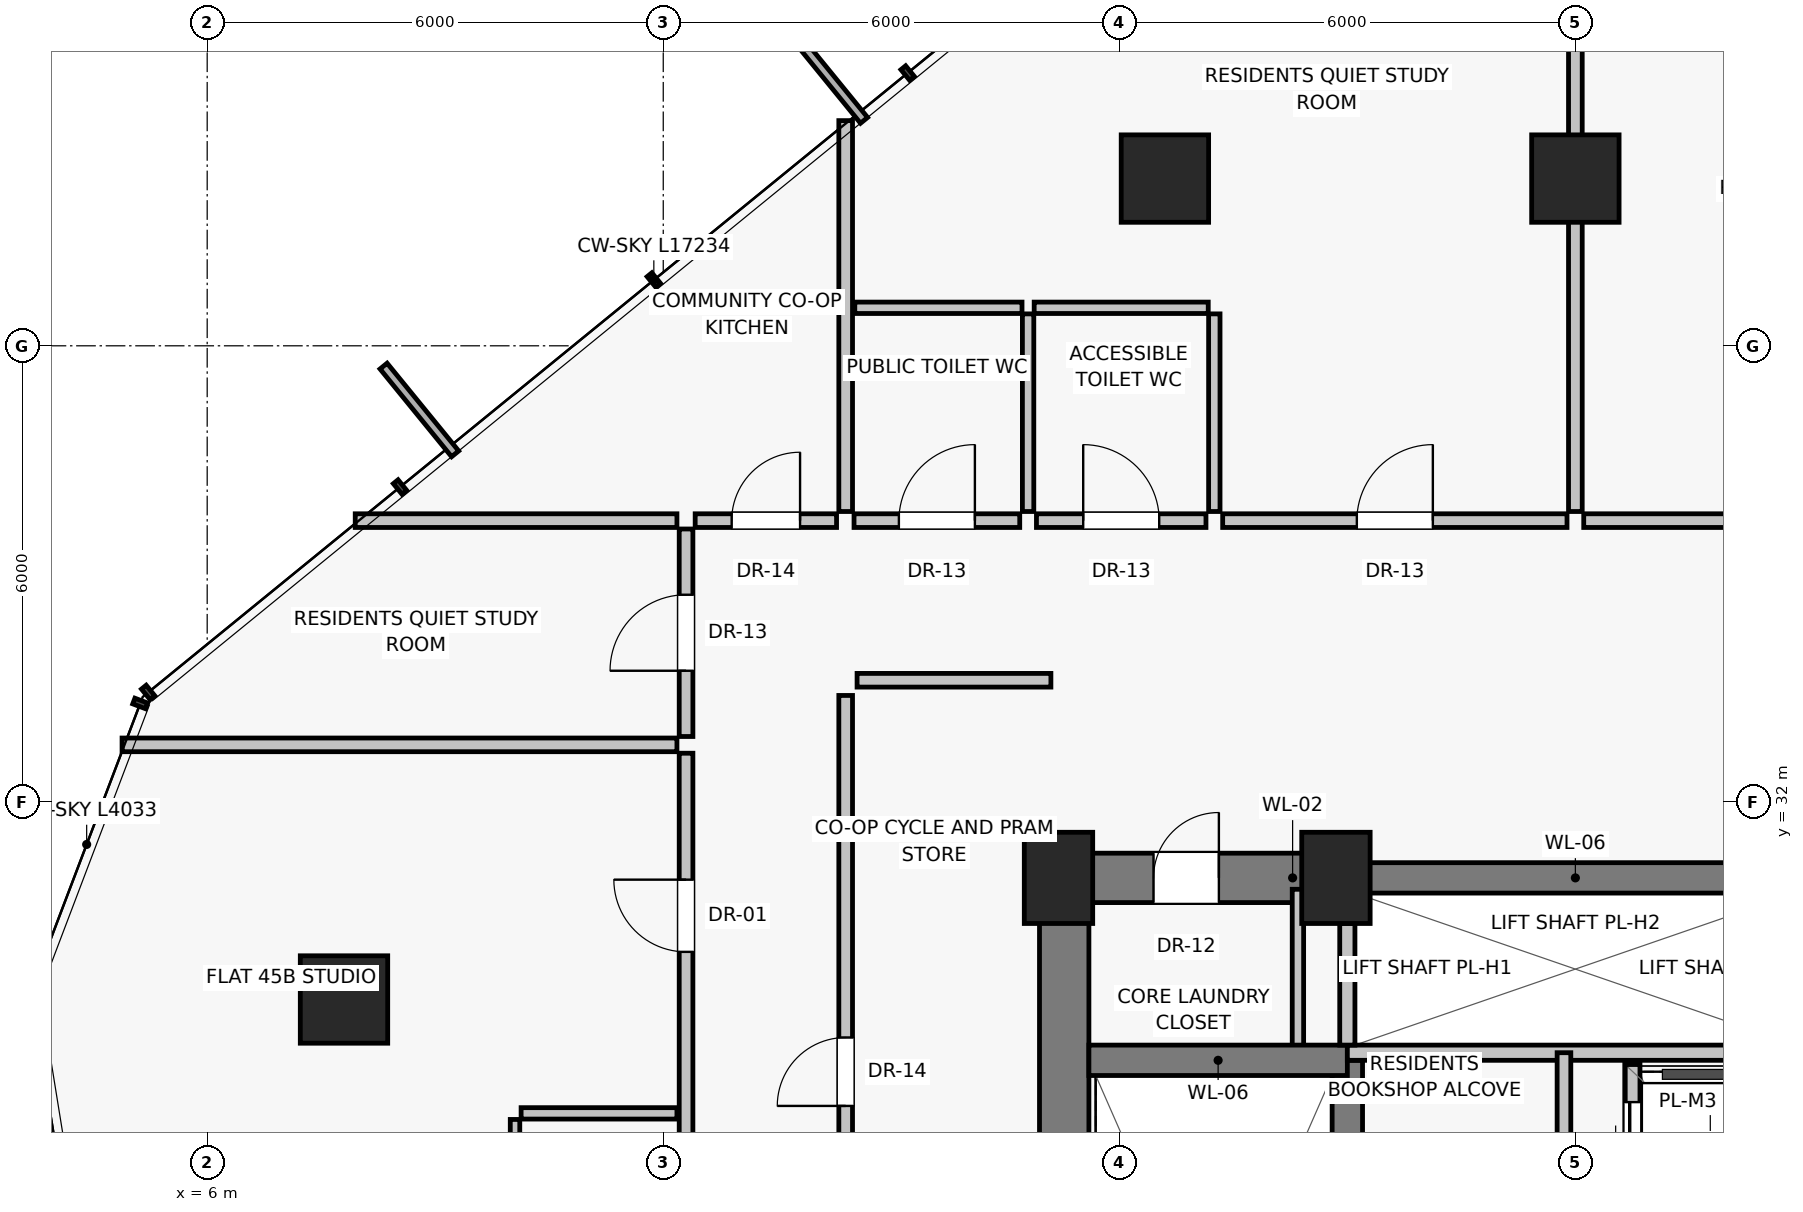
"""IFC4 building model, lengths in metres.
Left out: names, types, materials, properties, quantities, classifications, styles, units other than length and angle.
Written with IfcOpenShell. Run it as: python <this file> out.ifc"""

import sys

from ifc_helpers import new_model, si_unit, direction, frame, frame_2d, origin, origin_2d, place, context, subcontext, project, spatial, rectangle, extrude, source, transform, mapped, element, fill, save


model = new_model("IFC4")
c1 = context("Model", 3, precision=1e-05, world=origin(), true_north=direction((0.0, 1.0)))
c2 = subcontext(c1, "Body", "Model", "MODEL_VIEW")
j1 = project(units=[si_unit("LENGTHUNIT", "METRE"), si_unit("PLANEANGLEUNIT", "RADIAN")], contexts=[c1])
p1 = place(None, origin())
s1 = spatial("IfcSite", under=j1, at=p1, CompositionType="ELEMENT")
p2 = place(p1, origin())
s2 = spatial("IfcBuilding", under=s1, at=p2, CompositionType="ELEMENT")
p3 = place(p2, frame((0.0, 0.0, 158.75)))
s3 = spatial("IfcBuildingStorey", under=s2, at=p3, CompositionType="ELEMENT", Elevation=158.75)
for number, where, z_axis, x_axis in (
    (1, (17.2, 31.0, 0.0), (0.0, 0.0, 1.0), (1.0, 0.0, 0.0)),
    (2, (20.85, 31.0, 0.0), (0.0, 0.0, 1.0), (1.0, 0.0, 0.0)),
):
    element("IfcColumn", number, at=place(p3, frame(where, z_axis=z_axis, x_axis=x_axis)), inside=s3, PredefinedType="PILASTER", context=c2, shape_type="SweptSolid", body=[
        extrude(rectangle(XDim=0.9, YDim=1.2, at=origin_2d()), origin(), (0.0, 0.0, 1.0), 4.3),
    ])
for number, where, z_axis, x_axis in (
    (3, (24.0, 40.2, 0.0), (0.0, 0.0, 1.0), (1.0, 0.0, 0.0)),
    (4, (18.6, 40.2, 0.0), (0.0, 0.0, 1.0), (1.0, 0.0, 0.0)),
    (5, (7.8, 29.4, 0.0), (0.0, 0.0, 1.0), (1.0, 0.0, 0.0)),
):
    element("IfcColumn", number, at=place(p3, frame(where, z_axis=z_axis, x_axis=x_axis)), inside=s3, PredefinedType="COLUMN", context=c2, shape_type="SweptSolid", body=[
        extrude(rectangle(XDim=1.15, YDim=1.15, at=origin_2d()), origin(), (0.0, 0.0, 1.0), 4.3),
    ])
p4 = place(p3, frame((17.275, 16.8, 0.0), z_axis=(0.0, 0.0, 1.0), x_axis=(0.0, 1.0, 0.0)))
e6 = element("IfcWall", 6, at=p4, inside=s3, PredefinedType="SHEAR", context=c2, shape_type="SweptSolid", body=[
    extrude(rectangle(XDim=14.2, YDim=0.65, at=frame_2d((7.1, 0.0))), origin(), (0.0, 0.0, 1.0), 4.05),
])
p5 = place(p3, frame((17.2, 31.0, 0.0), z_axis=(0.0, 0.0, 1.0), x_axis=(1.0, 0.0, 0.0)))
e7 = element("IfcWall", 7, at=p5, inside=s3, PredefinedType="SHEAR", context=c2, shape_type="SweptSolid", body=[
    extrude(rectangle(XDim=3.8, YDim=0.65, at=frame_2d((1.9, 0.0))), origin(), (0.0, 0.0, 1.0), 4.05),
])
p6 = place(p5, frame((1.25, 0.0, 0.0)))
e8 = element("IfcOpeningElement", 8, at=p6, cuts=e7, PredefinedType="OPENING", context=c2, shape_type="SweptSolid", body=[
    extrude(rectangle(XDim=0.86, YDim=2.01, at=frame_2d((0.43, 1.005))), frame((0.0, 0.335, 0.0), z_axis=(0.0, -1.0, 0.0), x_axis=(1.0, 0.0, 0.0)), (0.0, 0.0, 1.0), 0.67),
])
p7 = place(p3, frame((21.0, 31.0, 0.0), z_axis=(0.0, 0.0, 1.0), x_axis=(1.0, 0.0, 0.0)))
e9 = element("IfcWall", 9, at=p7, inside=s3, PredefinedType="SHEAR", context=c2, shape_type="SweptSolid", body=[
    extrude(rectangle(XDim=6.0, YDim=0.4, at=frame_2d((3.0, 0.0))), origin(), (0.0, 0.0, 1.0), 4.05),
])
p8 = place(p3, frame((20.35, 28.65, 0.0), z_axis=(0.0, 0.0, 1.0), x_axis=(0.0, 1.0, 0.0)))
e10 = element("IfcWall", 10, at=p8, inside=s3, PredefinedType="PARTITIONING", context=c2, shape_type="SweptSolid", body=[
    extrude(rectangle(XDim=2.2, YDim=0.15, at=frame_2d((1.1, 0.0))), origin(), (0.0, 0.0, 1.0), 4.05),
])
p9 = place(p3, frame((21.0, 19.8, 0.0), z_axis=(0.0, 0.0, 1.0), x_axis=(0.0, 1.0, 0.0)))
e11 = element("IfcWall", 11, at=p9, inside=s3, PredefinedType="SHEAR", context=c2, shape_type="SweptSolid", body=[
    extrude(rectangle(XDim=8.8, YDim=0.4, at=frame_2d((4.4, 0.0))), origin(), (0.0, 0.0, 1.0), 4.05),
])
p10 = place(p3, frame((17.6, 28.6, 0.0), z_axis=(0.0, 0.0, 1.0), x_axis=(1.0, 0.0, 0.0)))
e12 = element("IfcWall", 12, at=p10, inside=s3, PredefinedType="SHEAR", context=c2, shape_type="SweptSolid", body=[
    extrude(rectangle(XDim=3.4, YDim=0.4, at=frame_2d((1.7, 0.0))), origin(), (0.0, 0.0, 1.0), 4.05),
])
p11 = place(p3, frame((21.0, 28.7, 0.0), z_axis=(0.0, 0.0, 1.0), x_axis=(1.0, 0.0, 0.0)))
e13 = element("IfcWall", 13, at=p11, inside=s3, PredefinedType="SOLIDWALL", context=c2, shape_type="SweptSolid", body=[
    extrude(rectangle(XDim=6.0, YDim=0.2, at=frame_2d((3.0, 0.0))), origin(), (0.0, 0.0, 1.0), 4.05),
])
p12 = place(p3, frame((21.0, 28.8, 0.0), z_axis=(0.0, 0.0, 1.0), x_axis=(0.0, 1.0, 0.0)))
e14 = element("IfcWall", 14, at=p12, inside=s3, PredefinedType="SOLIDWALL", context=c2, shape_type="SweptSolid", body=[
    extrude(rectangle(XDim=1.6, YDim=0.2, at=frame_2d((0.8, 0.0))), origin(), (0.0, 0.0, 1.0), 4.05),
])
p13 = place(p3, frame((23.85, 25.62, 0.0), z_axis=(0.0, 0.0, 1.0), x_axis=(0.0, 1.0, 0.0)))
e15 = element("IfcWall", 15, at=p13, inside=s3, PredefinedType="PARTITIONING", context=c2, shape_type="SweptSolid", body=[
    extrude(rectangle(XDim=3.08, YDim=0.18, at=frame_2d((1.54, 0.0))), origin(), (0.0, 0.0, 1.0), 4.05),
])
p14 = place(p13, frame((0.9, 0.0, 0.0)))
e16 = element("IfcOpeningElement", 16, at=p14, cuts=e15, PredefinedType="OPENING", context=c2, shape_type="SweptSolid", body=[
    extrude(rectangle(XDim=0.9, YDim=2.01, at=frame_2d((0.45, 1.005))), frame((0.0, 0.1, 0.0), z_axis=(0.0, -1.0, 0.0), x_axis=(1.0, 0.0, 0.0)), (0.0, 0.0, 1.0), 0.2),
])
p15 = place(p3, frame((24.75, 22.6, 0.0), z_axis=(0.0, 0.0, 1.0), x_axis=(0.0, 1.0, 0.0)))
e17 = element("IfcWall", 17, at=p15, inside=s3, PredefinedType="SOLIDWALL", context=c2, shape_type="SweptSolid", body=[
    extrude(rectangle(XDim=5.95, YDim=0.2, at=frame_2d((2.975, 0.0))), origin(), (0.0, 0.0, 1.0), 4.05),
])
p16 = place(p15, frame((0.45, 0.0, 0.0)))
e18 = element("IfcOpeningElement", 18, at=p16, cuts=e17, PredefinedType="OPENING", context=c2, shape_type="SweptSolid", body=[
    extrude(rectangle(XDim=1.1, YDim=2.08, at=frame_2d((0.55, 1.04))), frame((0.0, 0.11, 0.0), z_axis=(0.0, -1.0, 0.0), x_axis=(1.0, 0.0, 0.0)), (0.0, 0.0, 1.0), 0.22),
])
p17 = place(p15, frame((2.4, 0.0, 0.0)))
e19 = element("IfcOpeningElement", 19, at=p17, cuts=e17, PredefinedType="OPENING", context=c2, shape_type="SweptSolid", body=[
    extrude(rectangle(XDim=1.1, YDim=2.08, at=frame_2d((0.55, 1.04))), frame((0.0, 0.11, 0.0), z_axis=(0.0, -1.0, 0.0), x_axis=(1.0, 0.0, 0.0)), (0.0, 0.0, 1.0), 0.22),
])
p18 = place(p15, frame((4.35, 0.0, 0.0)))
e20 = element("IfcOpeningElement", 20, at=p18, cuts=e17, PredefinedType="OPENING", context=c2, shape_type="SweptSolid", body=[
    extrude(rectangle(XDim=1.1, YDim=2.08, at=frame_2d((0.55, 1.04))), frame((0.0, 0.11, 0.0), z_axis=(0.0, -1.0, 0.0), x_axis=(1.0, 0.0, 0.0)), (0.0, 0.0, 1.0), 0.22),
])
p19 = place(p3, frame((14.4, 24.2, 0.0), z_axis=(0.0, 0.0, 1.0), x_axis=(0.0, 1.0, 0.0)))
e21 = element("IfcWall", 21, at=p19, inside=s3, PredefinedType="PARTITIONING", context=c2, shape_type="SweptSolid", body=[
    extrude(rectangle(XDim=9.2, YDim=0.18, at=frame_2d((4.6, 0.0))), origin(), (0.0, 0.0, 1.0), 4.05),
])
p20 = place(p19, frame((3.8, 0.0, 0.0)))
e22 = element("IfcOpeningElement", 22, at=p20, cuts=e21, PredefinedType="OPENING", context=c2, shape_type="SweptSolid", body=[
    extrude(rectangle(XDim=0.9, YDim=2.01, at=frame_2d((0.45, 1.005))), frame((0.0, 0.1, 0.0), z_axis=(0.0, -1.0, 0.0), x_axis=(1.0, 0.0, 0.0)), (0.0, 0.0, 1.0), 0.2),
])
p21 = place(p3, frame((14.55, 33.6, 0.0), z_axis=(0.0, 0.0, 1.0), x_axis=(1.0, 0.0, 0.0)))
e23 = element("IfcWall", 23, at=p21, inside=s3, PredefinedType="PARTITIONING", context=c2, shape_type="SweptSolid", body=[
    extrude(rectangle(XDim=2.55, YDim=0.18, at=frame_2d((1.275, 0.0))), origin(), (0.0, 0.0, 1.0), 4.05),
])
p22 = place(p3, frame((14.4, 35.82, 0.0), z_axis=(0.0, 0.0, 1.0), x_axis=(0.0, 1.0, 0.0)))
e24 = element("IfcWall", 24, at=p22, inside=s3, PredefinedType="PARTITIONING", context=c2, shape_type="SweptSolid", body=[
    extrude(rectangle(XDim=5.142, YDim=0.18, at=frame_2d((2.571, 0.0))), origin(), (0.0, 0.0, 1.0), 4.05),
])
p23 = place(p3, frame((14.51, 35.7, 0.0), z_axis=(0.0, 0.0, 1.0), x_axis=(1.0, 0.0, 0.0)))
e25 = element("IfcWall", 25, at=p23, inside=s3, PredefinedType="PARTITIONING", context=c2, shape_type="SweptSolid", body=[
    extrude(rectangle(XDim=2.18, YDim=0.18, at=frame_2d((1.09, 0.0))), origin(), (0.0, 0.0, 1.0), 4.05),
])
p24 = place(p23, frame((0.59, 0.0, 0.0)))
e26 = element("IfcOpeningElement", 26, at=p24, cuts=e25, PredefinedType="OPENING", context=c2, shape_type="SweptSolid", body=[
    extrude(rectangle(XDim=1.0, YDim=2.01, at=frame_2d((0.5, 1.005))), frame((0.0, 0.1, 0.0), z_axis=(0.0, -1.0, 0.0), x_axis=(1.0, 0.0, 0.0)), (0.0, 0.0, 1.0), 0.2),
])
p25 = place(p3, frame((16.91, 35.7, 0.0), z_axis=(0.0, 0.0, 1.0), x_axis=(1.0, 0.0, 0.0)))
e27 = element("IfcWall", 27, at=p25, inside=s3, PredefinedType="PARTITIONING", context=c2, shape_type="SweptSolid", body=[
    extrude(rectangle(XDim=2.23, YDim=0.18, at=frame_2d((1.115, 0.0))), origin(), (0.0, 0.0, 1.0), 3.63),
])
p26 = place(p25, frame((0.615, 0.0, 0.0)))
e28 = element("IfcOpeningElement", 28, at=p26, cuts=e27, PredefinedType="OPENING", context=c2, shape_type="SweptSolid", body=[
    extrude(rectangle(XDim=1.0, YDim=2.01, at=frame_2d((0.5, 1.005))), frame((0.0, 0.1, 0.0), z_axis=(0.0, -1.0, 0.0), x_axis=(1.0, 0.0, 0.0)), (0.0, 0.0, 1.0), 0.2),
])
p27 = place(p3, frame((19.36, 35.7, 0.0), z_axis=(0.0, 0.0, 1.0), x_axis=(1.0, 0.0, 0.0)))
e29 = element("IfcWall", 29, at=p27, inside=s3, PredefinedType="PARTITIONING", context=c2, shape_type="SweptSolid", body=[
    extrude(rectangle(XDim=4.53, YDim=0.18, at=frame_2d((2.265, 0.0))), origin(), (0.0, 0.0, 1.0), 3.63),
])
p28 = place(p27, frame((1.765, 0.0, 0.0)))
e30 = element("IfcOpeningElement", 30, at=p28, cuts=e29, PredefinedType="OPENING", context=c2, shape_type="SweptSolid", body=[
    extrude(rectangle(XDim=1.0, YDim=2.01, at=frame_2d((0.5, 1.005))), frame((0.0, 0.1, 0.0), z_axis=(0.0, -1.0, 0.0), x_axis=(1.0, 0.0, 0.0)), (0.0, 0.0, 1.0), 0.2),
])
p29 = place(p3, frame((24.11, 35.7, 0.0), z_axis=(0.0, 0.0, 1.0), x_axis=(1.0, 0.0, 0.0)))
e31 = element("IfcWall", 31, at=p29, inside=s3, PredefinedType="PARTITIONING", context=c2, shape_type="SweptSolid", body=[
    extrude(rectangle(XDim=9.38, YDim=0.18, at=frame_2d((4.69, 0.0))), origin(), (0.0, 0.0, 1.0), 3.63),
])
p30 = place(p29, frame((4.19, 0.0, 0.0)))
e32 = element("IfcOpeningElement", 32, at=p30, cuts=e31, PredefinedType="OPENING", context=c2, shape_type="SweptSolid", body=[
    extrude(rectangle(XDim=1.0, YDim=2.01, at=frame_2d((0.5, 1.005))), frame((0.0, 0.1, 0.0), z_axis=(0.0, -1.0, 0.0), x_axis=(1.0, 0.0, 0.0)), (0.0, 0.0, 1.0), 0.2),
])
for number, where, z_axis, x_axis in (
    (33, (16.8, 35.82, 0.0), (0.0, 0.0, 1.0), (0.0, 1.0, 0.0)),
    (34, (19.25, 35.82, 0.0), (0.0, 0.0, 1.0), (0.0, 1.0, 0.0)),
):
    element("IfcWall", number, at=place(p3, frame(where, z_axis=z_axis, x_axis=x_axis)), inside=s3, PredefinedType="PARTITIONING", context=c2, shape_type="SweptSolid", body=[
        extrude(rectangle(XDim=2.6, YDim=0.15, at=frame_2d((1.3, 0.0))), origin(), (0.0, 0.0, 1.0), 4.05),
    ])
p31 = place(p3, frame((14.52, 38.5, 0.0), z_axis=(0.0, 0.0, 1.0), x_axis=(1.0, 0.0, 0.0)))
e35 = element("IfcWall", 35, at=p31, inside=s3, PredefinedType="PARTITIONING", context=c2, shape_type="SweptSolid", body=[
    extrude(rectangle(XDim=2.2, YDim=0.15, at=frame_2d((1.1, 0.0))), origin(), (0.0, 0.0, 1.0), 4.05),
])
p32 = place(p3, frame((16.88, 38.5, 0.0), z_axis=(0.0, 0.0, 1.0), x_axis=(1.0, 0.0, 0.0)))
e36 = element("IfcWall", 36, at=p32, inside=s3, PredefinedType="PARTITIONING", context=c2, shape_type="SweptSolid", body=[
    extrude(rectangle(XDim=2.29, YDim=0.15, at=frame_2d((1.145, 0.0))), origin(), (0.0, 0.0, 1.0), 4.05),
])
p33 = place(p3, frame((24.0, 35.82, 0.0), z_axis=(0.0, 0.0, 1.0), x_axis=(0.0, 1.0, 0.0)))
e37 = element("IfcWall", 37, at=p33, inside=s3, PredefinedType="PARTITIONING", context=c2, shape_type="SweptSolid", body=[
    extrude(rectangle(XDim=8.732, YDim=0.18, at=frame_2d((4.366, 0.0))), origin(), (0.0, 0.0, 1.0), 4.05),
])
p34 = place(p3, frame((12.18, 35.7, 0.0), z_axis=(0.0, 0.0, 1.0), x_axis=(-1.0, 0.0, 0.0)))
e38 = element("IfcWall", 38, at=p34, inside=s3, PredefinedType="PARTITIONING", context=c2, shape_type="SweptSolid", body=[
    extrude(rectangle(XDim=4.232, YDim=0.18, at=frame_2d((2.116, 0.0))), origin(), (0.0, 0.0, 1.0), 4.05),
])
p35 = place(p3, frame((12.3, 32.86, 0.0), z_axis=(0.0, 0.0, 1.0), x_axis=(0.0, 1.0, 0.0)))
e39 = element("IfcWall", 39, at=p35, inside=s3, PredefinedType="PARTITIONING", context=c2, shape_type="SweptSolid", body=[
    extrude(rectangle(XDim=2.73, YDim=0.18, at=frame_2d((1.365, 0.0))), origin(), (0.0, 0.0, 1.0), 4.05),
])
p36 = place(p35, frame((0.865, 0.0, 0.0)))
e40 = element("IfcOpeningElement", 40, at=p36, cuts=e39, PredefinedType="OPENING", context=c2, shape_type="SweptSolid", body=[
    extrude(rectangle(XDim=1.0, YDim=2.01, at=frame_2d((0.5, 1.005))), frame((0.0, 0.1, 0.0), z_axis=(0.0, -1.0, 0.0), x_axis=(1.0, 0.0, 0.0)), (0.0, 0.0, 1.0), 0.2),
])
p37 = place(p3, frame((12.18, 32.75, 0.0), z_axis=(0.0, 0.0, 1.0), x_axis=(-1.0, 0.0, 0.0)))
e41 = element("IfcWall", 41, at=p37, inside=s3, PredefinedType="PARTITIONING", context=c2, shape_type="SweptSolid", body=[
    extrude(rectangle(XDim=7.3, YDim=0.18, at=frame_2d((3.65, 0.0))), origin(), (0.0, 0.0, 1.0), 4.05),
])
p38 = place(p3, frame((12.3, 25.662, 0.0), z_axis=(0.0, 0.0, 1.0), x_axis=(0.0, 1.0, 0.0)))
e42 = element("IfcWall", 42, at=p38, inside=s3, PredefinedType="PARTITIONING", context=c2, shape_type="SweptSolid", body=[
    extrude(rectangle(XDim=6.978, YDim=0.18, at=frame_2d((3.489, 0.0))), origin(), (0.0, 0.0, 1.0), 3.63),
])
p39 = place(p38, frame((4.365, 0.0, 0.0)))
e43 = element("IfcOpeningElement", 43, at=p39, cuts=e42, PredefinedType="OPENING", context=c2, shape_type="SweptSolid", body=[
    extrude(rectangle(XDim=0.95, YDim=2.02, at=frame_2d((0.475, 1.01))), frame((0.0, 0.1, 0.0), z_axis=(0.0, -1.0, 0.0), x_axis=(1.0, 0.0, 0.0)), (0.0, 0.0, 1.0), 0.2),
])
p40 = place(p3, frame((12.18, 27.902, 0.0), z_axis=(0.0, 0.0, 1.0), x_axis=(-1.0, 0.0, 0.0)))
e44 = element("IfcWall", 44, at=p40, inside=s3, PredefinedType="PARTITIONING", context=c2, shape_type="SweptSolid", body=[
    extrude(rectangle(XDim=2.05, YDim=0.15, at=frame_2d((1.025, 0.0))), origin(), (0.0, 0.0, 1.0), 4.05),
])
p41 = place(p3, frame((10.05, 25.672, 0.0), z_axis=(0.0, 0.0, 1.0), x_axis=(0.0, 1.0, 0.0)))
e45 = element("IfcWall", 45, at=p41, inside=s3, PredefinedType="PARTITIONING", context=c2, shape_type="SweptSolid", body=[
    extrude(rectangle(XDim=2.15, YDim=0.125, at=frame_2d((1.075, 0.0))), origin(), (0.0, 0.0, 1.0), 4.05),
])
p42 = place(p41, frame((0.645, 0.0, 0.0)))
e46 = element("IfcOpeningElement", 46, at=p42, cuts=e45, PredefinedType="OPENING", context=c2, shape_type="SweptSolid", body=[
    extrude(rectangle(XDim=0.86, YDim=2.01, at=frame_2d((0.43, 1.005))), frame((0.0, 0.073, 0.0), z_axis=(0.0, -1.0, 0.0), x_axis=(1.0, 0.0, 0.0)), (0.0, 0.0, 1.0), 0.145),
])
p43 = place(p3, frame((12.42, 35.7, 0.0), z_axis=(0.0, 0.0, 1.0), x_axis=(1.0, 0.0, 0.0)))
e47 = element("IfcWall", 47, at=p43, inside=s3, PredefinedType="PARTITIONING", context=c2, shape_type="SweptSolid", body=[
    extrude(rectangle(XDim=1.86, YDim=0.18, at=frame_2d((0.93, 0.0))), origin(), (0.0, 0.0, 1.0), 4.05),
])
p44 = place(p43, frame((0.48, 0.0, 0.0)))
e48 = element("IfcOpeningElement", 48, at=p44, cuts=e47, PredefinedType="OPENING", context=c2, shape_type="SweptSolid", body=[
    extrude(rectangle(XDim=0.9, YDim=2.01, at=frame_2d((0.45, 1.005))), frame((0.0, 0.1, 0.0), z_axis=(0.0, -1.0, 0.0), x_axis=(1.0, 0.0, 0.0)), (0.0, 0.0, 1.0), 0.2),
])
m1 = source(origin(), c2, "Body", "SweptSolid", [
    extrude(rectangle(XDim=0.86, YDim=2.01, at=frame_2d((0.43, 1.005))), frame((0.0, 0.025, 0.0), z_axis=(0.0, -1.0, 0.0), x_axis=(1.0, 0.0, 0.0)), (0.0, 0.0, 1.0), 0.05),
])
p45 = place(p6, origin())
e49 = element("IfcDoor", 49, at=p45, inside=s3, OperationType="SINGLE_SWING_RIGHT", PredefinedType="DOOR", context=c2, shape_type="MappedRepresentation", body=[
    mapped(m1, transform((0.0, 0.0, 0.0), scale=1.0)),
])
fill(e8, e49)
m2 = source(origin(), c2, "Body", "SweptSolid", [
    extrude(rectangle(XDim=1.1, YDim=2.08, at=frame_2d((0.55, 1.04))), frame((0.0, 0.025, 0.0), z_axis=(0.0, -1.0, 0.0), x_axis=(1.0, 0.0, 0.0)), (0.0, 0.0, 1.0), 0.05),
])
p46 = place(p18, origin())
e50 = element("IfcDoor", 50, at=p46, inside=s3, OperationType="SLIDING_TO_LEFT", PredefinedType="DOOR", context=c2, shape_type="MappedRepresentation", body=[
    mapped(m2, transform((0.0, 0.0, 0.0), scale=1.0)),
])
fill(e20, e50)
m3 = source(origin(), c2, "Body", "SweptSolid", [
    extrude(rectangle(XDim=0.9, YDim=2.01, at=frame_2d((0.45, 1.005))), frame((0.0, 0.025, 0.0), z_axis=(0.0, -1.0, 0.0), x_axis=(1.0, 0.0, 0.0)), (0.0, 0.0, 1.0), 0.05),
])
p47 = place(p20, origin())
e51 = element("IfcDoor", 51, at=p47, inside=s3, OperationType="SINGLE_SWING_LEFT", PredefinedType="DOOR", context=c2, shape_type="MappedRepresentation", body=[
    mapped(m3, transform((0.0, 0.0, 0.0), scale=1.0)),
])
fill(e22, e51)
m4 = source(origin(), c2, "Body", "SweptSolid", [
    extrude(rectangle(XDim=1.0, YDim=2.01, at=frame_2d((0.5, 1.005))), frame((0.0, 0.025, 0.0), z_axis=(0.0, -1.0, 0.0), x_axis=(1.0, 0.0, 0.0)), (0.0, 0.0, 1.0), 0.05),
])
p48 = place(p24, origin())
e52 = element("IfcDoor", 52, at=p48, inside=s3, OperationType="SINGLE_SWING_RIGHT", PredefinedType="DOOR", context=c2, shape_type="MappedRepresentation", body=[
    mapped(m4, transform((0.0, 0.0, 0.0), scale=1.0)),
])
fill(e26, e52)
p49 = place(p26, origin())
e53 = element("IfcDoor", 53, at=p49, inside=s3, OperationType="SINGLE_SWING_LEFT", PredefinedType="DOOR", context=c2, shape_type="MappedRepresentation", body=[
    mapped(m4, transform((0.0, 0.0, 0.0), scale=1.0)),
])
fill(e28, e53)
p50 = place(p28, origin())
e54 = element("IfcDoor", 54, at=p50, inside=s3, OperationType="SINGLE_SWING_RIGHT", PredefinedType="DOOR", context=c2, shape_type="MappedRepresentation", body=[
    mapped(m4, transform((0.0, 0.0, 0.0), scale=1.0)),
])
fill(e30, e54)
p51 = place(p36, origin())
e55 = element("IfcDoor", 55, at=p51, inside=s3, OperationType="SINGLE_SWING_LEFT", PredefinedType="DOOR", context=c2, shape_type="MappedRepresentation", body=[
    mapped(m4, transform((0.0, 0.0, 0.0), scale=1.0)),
])
fill(e40, e55)
m5 = source(origin(), c2, "Body", "SweptSolid", [
    extrude(rectangle(XDim=0.95, YDim=2.02, at=frame_2d((0.475, 1.01))), frame((0.0, 0.025, 0.0), z_axis=(0.0, -1.0, 0.0), x_axis=(1.0, 0.0, 0.0)), (0.0, 0.0, 1.0), 0.05),
])
p52 = place(p39, origin())
e56 = element("IfcDoor", 56, at=p52, inside=s3, OperationType="SINGLE_SWING_RIGHT", PredefinedType="DOOR", context=c2, shape_type="MappedRepresentation", body=[
    mapped(m5, transform((0.0, 0.0, 0.0), scale=1.0)),
])
fill(e43, e56)
p53 = place(p44, origin())
e57 = element("IfcDoor", 57, at=p53, inside=s3, OperationType="SINGLE_SWING_RIGHT", PredefinedType="DOOR", context=c2, shape_type="MappedRepresentation", body=[
    mapped(m3, transform((0.0, 0.0, 0.0), scale=1.0)),
])
fill(e48, e57)
save(model, sys.argv[1])
